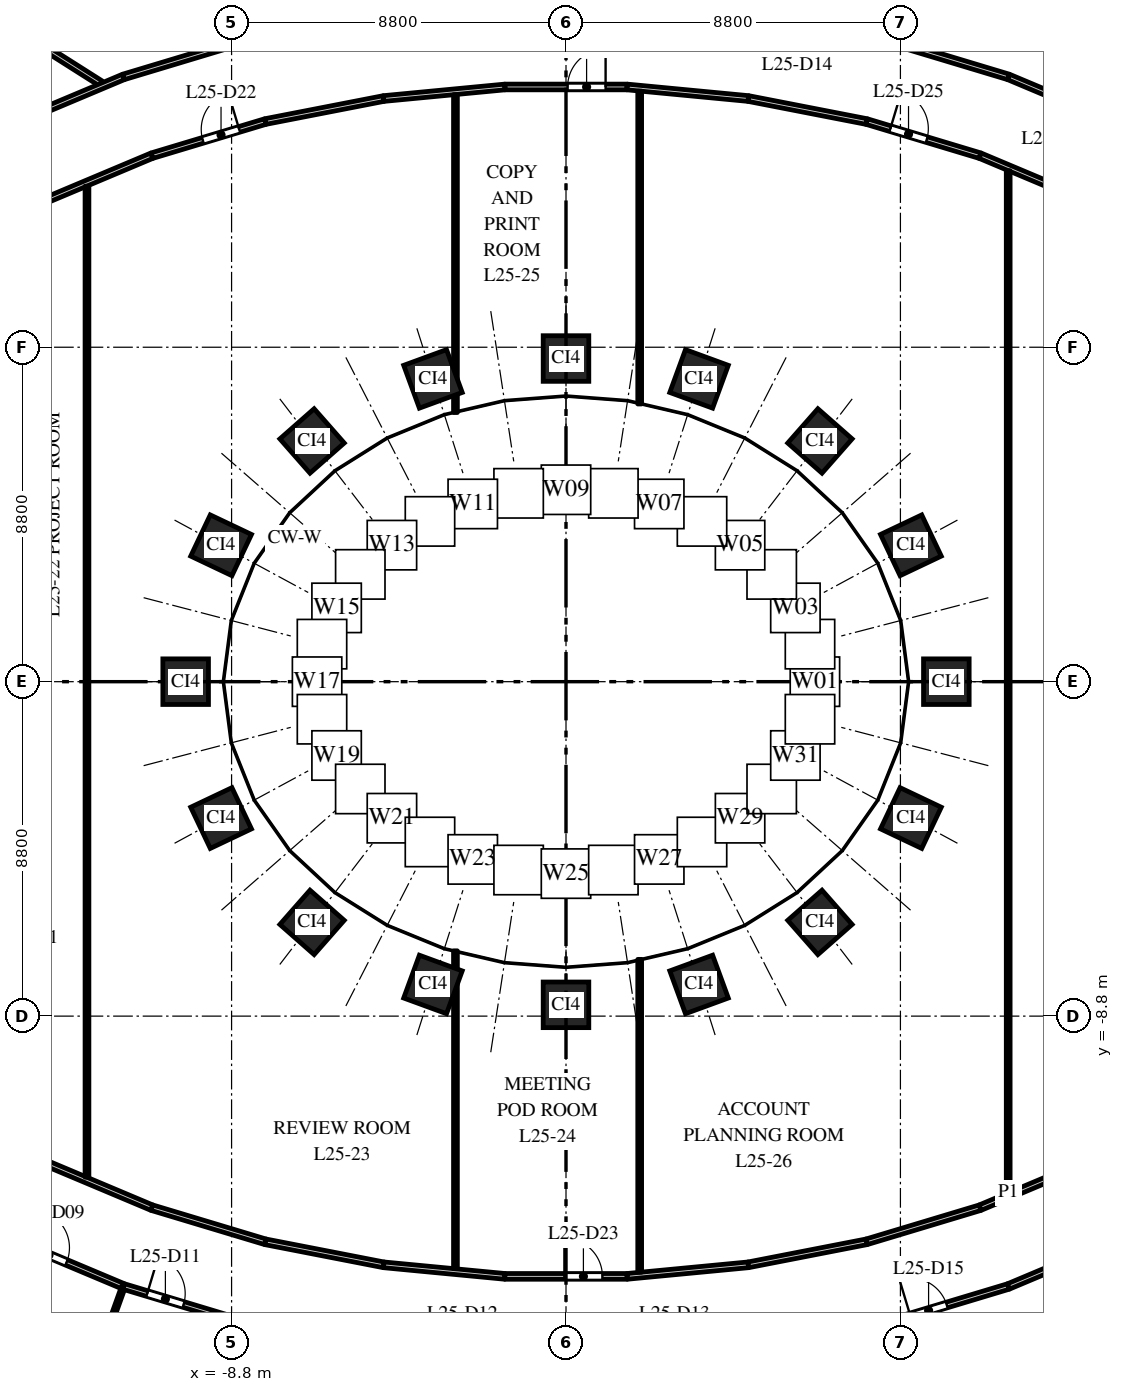
"""IFC4 building model, lengths in metres.
Left out: names, types, materials, properties, quantities, classifications, styles, units other than length and angle.
Written with IfcOpenShell. Run it as: python <this file> out.ifc"""

import sys

from ifc_helpers import new_model, si_unit, direction, frame, frame_2d, origin, origin_2d, place, context, subcontext, project, spatial, rectangle, extrude, element, fill, save


model = new_model("IFC4")
c1 = context("Model", 3, precision=1e-05, world=origin(), true_north=direction((0.0, 1.0)))
c2 = subcontext(c1, "Body", "Model", "MODEL_VIEW")
j1 = project(units=[si_unit("LENGTHUNIT", "METRE"), si_unit("PLANEANGLEUNIT", "RADIAN")], contexts=[c1])
p1 = place(None, origin())
s1 = spatial("IfcSite", under=j1, at=p1, CompositionType="ELEMENT")
p2 = place(p1, origin())
s2 = spatial("IfcBuilding", under=s1, at=p2, CompositionType="ELEMENT")
p3 = place(p2, frame((0.0, 0.0, 112.0)))
s3 = spatial("IfcBuildingStorey", under=s2, at=p3, CompositionType="ELEMENT", Elevation=112.0)
for number, where, z_axis, x_axis in (
    (1, (10.008, 0.0, 0.0), (0.0, 0.0, 1.0), (0.0, 1.0, 0.0)),
    (2, (9.076, 3.588, 0.0), (0.0, 0.0, 1.0), (-0.429, 0.903, 0.0)),
    (3, (6.682, 6.334, 0.0), (0.0, 0.0, 1.0), (-0.751, 0.66, 0.0)),
    (4, (3.501, 7.967, 0.0), (0.0, 0.0, 1.0), (-0.939, 0.344, 0.0)),
    (5, (0.0, 8.503, 0.0), (0.0, 0.0, 1.0), (-1.0, 0.0, 0.0)),
    (6, (-3.501, 7.967, 0.0), (0.0, 0.0, 1.0), (-0.939, -0.344, 0.0)),
    (7, (-6.682, 6.334, 0.0), (0.0, 0.0, 1.0), (-0.751, -0.66, 0.0)),
    (8, (-9.076, 3.588, 0.0), (0.0, 0.0, 1.0), (-0.429, -0.903, 0.0)),
    (9, (-10.008, 0.0, 0.0), (0.0, 0.0, 1.0), (0.0, -1.0, 0.0)),
    (10, (-9.076, -3.588, 0.0), (0.0, 0.0, 1.0), (0.429, -0.903, 0.0)),
    (11, (-6.682, -6.334, 0.0), (0.0, 0.0, 1.0), (0.751, -0.66, 0.0)),
    (12, (-3.501, -7.967, 0.0), (0.0, 0.0, 1.0), (0.939, -0.344, 0.0)),
    (13, (0.0, -8.503, 0.0), (0.0, 0.0, 1.0), (1.0, 0.0, 0.0)),
    (14, (3.501, -7.967, 0.0), (0.0, 0.0, 1.0), (0.939, 0.344, 0.0)),
    (15, (6.682, -6.334, 0.0), (0.0, 0.0, 1.0), (0.751, 0.66, 0.0)),
    (16, (9.076, -3.588, 0.0), (0.0, 0.0, 1.0), (0.429, 0.903, 0.0)),
):
    element("IfcColumn", number, at=place(p3, frame(where, z_axis=z_axis, x_axis=x_axis)), inside=s3, PredefinedType="COLUMN", context=c2, shape_type="SweptSolid", body=[
        extrude(rectangle(XDim=1.2, YDim=1.2, at=origin_2d()), origin(), (0.0, 0.0, 1.0), 4.0),
    ])
p4 = place(p3, frame((-16.899, 18.695, 0.0), z_axis=(0.0, 0.0, 1.0), x_axis=(0.844493920995, -0.535565138337, 0.0)))
e17 = element("IfcWall", 17, at=p4, inside=s3, PredefinedType="PARTITIONING", context=c2, shape_type="SweptSolid", body=[
    extrude(rectangle(XDim=5.512, YDim=0.15, at=frame_2d((2.756, 0.0))), origin(), (0.0, 0.0, 1.0), 2.85),
])
p5 = place(p3, frame((-14.665, -14.642, 0.0), z_axis=(0.0, 0.0, 1.0), x_axis=(0.921850993012, -0.387544509293, 0.0)))
e18 = element("IfcWall", 18, at=p5, inside=s3, PredefinedType="PARTITIONING", context=c2, shape_type="SweptSolid", body=[
    extrude(rectangle(XDim=3.259, YDim=0.15, at=frame_2d((1.629, 0.0))), origin(), (0.0, 0.0, 1.0), 2.85),
])
p6 = place(p5, frame((0.65, 0.0, 0.0)))
e19 = element("IfcOpeningElement", 19, at=p6, cuts=e18, PredefinedType="OPENING", context=c2, shape_type="SweptSolid", body=[
    extrude(rectangle(XDim=1.0, YDim=2.1, at=frame_2d((0.5, 1.05))), frame((0.0, 0.085, 0.0), z_axis=(0.0, -1.0, 0.0), x_axis=(1.0, 0.0, 0.0)), (0.0, 0.0, 1.0), 0.17),
])
p7 = place(p3, frame((-14.665, 14.642, 0.0), z_axis=(0.0, 0.0, 1.0), x_axis=(0.921789499058, 0.38769075231, 0.0)))
e20 = element("IfcWall", 20, at=p7, inside=s3, PredefinedType="PARTITIONING", context=c2, shape_type="SweptSolid", body=[
    extrude(rectangle(XDim=3.278, YDim=0.15, at=frame_2d((1.639, 0.0))), origin(), (0.0, 0.0, 1.0), 2.85),
])
for number, where, z_axis, x_axis in (
    (21, (-13.697, -12.662, 0.0), (0.0, 0.0, 1.0), (0.922, -0.388, 0.0)),
    (22, (-13.697, 12.662, 0.0), (0.0, 0.0, 1.0), (0.922, 0.388, 0.0)),
):
    element("IfcWall", number, at=place(p3, frame(where, z_axis=z_axis, x_axis=x_axis)), inside=s3, PredefinedType="PARTITIONING", context=c2, shape_type="SweptSolid", body=[
        extrude(rectangle(XDim=3.038, YDim=0.15, at=frame_2d((1.519, 0.0))), origin(), (0.0, 0.0, 1.0), 2.85),
    ])
p8 = place(p3, frame((-13.23, -20.327, 0.0), z_axis=(0.0, 0.0, 1.0), x_axis=(0.338411379185, 0.940998266969, 0.0)))
e23 = element("IfcWall", 23, at=p8, inside=s3, PredefinedType="PARTITIONING", context=c2, shape_type="SweptSolid", body=[
    extrude(rectangle(XDim=4.687, YDim=0.1, at=frame_2d((2.343, 0.0))), origin(), (0.0, 0.0, 1.0), 3.7),
])
p9 = place(p3, frame((-12.605, -13.036, 0.0), z_axis=(0.0, 0.0, 1.0), x_axis=(0.0, 1.0, 0.0)))
e24 = element("IfcWall", 24, at=p9, inside=s3, PredefinedType="PARTITIONING", context=c2, shape_type="SweptSolid", body=[
    extrude(rectangle(XDim=26.072, YDim=0.1, at=frame_2d((13.036, 0.0))), origin(), (0.0, 0.0, 1.0), 2.75),
])
p10 = place(p3, frame((-11.643, -15.913, 0.0), z_axis=(0.0, 0.0, 1.0), x_axis=(0.957584891346, -0.288151307243, 0.0)))
e25 = element("IfcWall", 25, at=p10, inside=s3, PredefinedType="PARTITIONING", context=c2, shape_type="SweptSolid", body=[
    extrude(rectangle(XDim=3.345, YDim=0.15, at=frame_2d((1.672, 0.0))), origin(), (0.0, 0.0, 1.0), 3.7),
])
p11 = place(p10, frame((0.65, 0.0, 0.0)))
e26 = element("IfcOpeningElement", 26, at=p11, cuts=e25, PredefinedType="OPENING", context=c2, shape_type="SweptSolid", body=[
    extrude(rectangle(XDim=1.0, YDim=2.1, at=frame_2d((0.5, 1.05))), frame((0.0, 0.085, 0.0), z_axis=(0.0, -1.0, 0.0), x_axis=(1.0, 0.0, 0.0)), (0.0, 0.0, 1.0), 0.17),
])
p12 = place(p3, frame((-11.643, 15.913, 0.0), z_axis=(0.0, 0.0, 1.0), x_axis=(0.957584891346, 0.288151307243, 0.0)))
e27 = element("IfcWall", 27, at=p12, inside=s3, PredefinedType="PARTITIONING", context=c2, shape_type="SweptSolid", body=[
    extrude(rectangle(XDim=3.345, YDim=0.15, at=frame_2d((1.672, 0.0))), origin(), (0.0, 0.0, 1.0), 3.7),
])
p13 = place(p3, frame((-10.897, -13.84, 0.0), z_axis=(0.0, 0.0, 1.0), x_axis=(0.957606118849, -0.28808075455, 0.0)))
e28 = element("IfcWall", 28, at=p13, inside=s3, PredefinedType="PARTITIONING", context=c2, shape_type="SweptSolid", body=[
    extrude(rectangle(XDim=3.117, YDim=0.15, at=frame_2d((1.559, 0.0))), origin(), (0.0, 0.0, 1.0), 3.7),
])
p14 = place(p3, frame((-10.897, 13.84, 0.0), z_axis=(0.0, 0.0, 1.0), x_axis=(0.957606118849, 0.28808075455, 0.0)))
e29 = element("IfcWall", 29, at=p14, inside=s3, PredefinedType="PARTITIONING", context=c2, shape_type="SweptSolid", body=[
    extrude(rectangle(XDim=3.117, YDim=0.15, at=frame_2d((1.559, 0.0))), origin(), (0.0, 0.0, 1.0), 3.7),
])
p15 = place(p14, frame((1.4, 0.0, 0.0)))
e30 = element("IfcOpeningElement", 30, at=p15, cuts=e29, PredefinedType="OPENING", context=c2, shape_type="SweptSolid", body=[
    extrude(rectangle(XDim=1.0, YDim=2.1, at=frame_2d((0.5, 1.05))), frame((0.0, 0.085, 0.0), z_axis=(0.0, -1.0, 0.0), x_axis=(1.0, 0.0, 0.0)), (0.0, 0.0, 1.0), 0.17),
])
for number, where, z_axis, x_axis in (
    (31, (-7.912, -14.738, 0.0), (0.0, 0.0, 1.0), (0.982, -0.191, 0.0)),
    (32, (-7.912, 14.738, 0.0), (0.0, 0.0, 1.0), (0.982, 0.191, 0.0)),
):
    element("IfcWall", number, at=place(p3, frame(where, z_axis=z_axis, x_axis=x_axis)), inside=s3, PredefinedType="PARTITIONING", context=c2, shape_type="SweptSolid", body=[
        extrude(rectangle(XDim=3.172, YDim=0.15, at=frame_2d((1.586, 0.0))), origin(), (0.0, 0.0, 1.0), 2.85),
    ])
for number, where, z_axis, x_axis in (
    (33, (-4.798, -15.344, 0.0), (0.0, 0.0, 1.0), (0.995, -0.095, 0.0)),
    (34, (-4.798, 15.344, 0.0), (0.0, 0.0, 1.0), (0.995, 0.095, 0.0)),
):
    element("IfcWall", number, at=place(p3, frame(where, z_axis=z_axis, x_axis=x_axis)), inside=s3, PredefinedType="PARTITIONING", context=c2, shape_type="SweptSolid", body=[
        extrude(rectangle(XDim=3.205, YDim=0.15, at=frame_2d((1.602, 0.0))), origin(), (0.0, 0.0, 1.0), 3.7),
    ])
for number, where, z_axis, x_axis in (
    (35, (-2.909, -15.445, 0.0), (0.0, 0.0, 1.0), (0.0, 1.0, 0.0)),
    (36, (-2.909, 7.082, 0.0), (0.0, 0.0, 1.0), (0.0, 1.0, 0.0)),
):
    element("IfcWall", number, at=place(p3, frame(where, z_axis=z_axis, x_axis=x_axis)), inside=s3, PredefinedType="PARTITIONING", context=c2, shape_type="SweptSolid", body=[
        extrude(rectangle(XDim=8.363, YDim=0.1, at=frame_2d((4.182, 0.0))), origin(), (0.0, 0.0, 1.0), 2.9),
    ])
p16 = place(p3, frame((-1.608, -15.648, 0.0), z_axis=(0.0, 0.0, 1.0), x_axis=(1.0, 0.0, 0.0)))
e37 = element("IfcWall", 37, at=p16, inside=s3, PredefinedType="PARTITIONING", context=c2, shape_type="SweptSolid", body=[
    extrude(rectangle(XDim=3.216, YDim=0.15, at=frame_2d((1.608, 0.0))), origin(), (0.0, 0.0, 1.0), 2.85),
])
p17 = place(p16, frame((1.566, 0.0, 0.0)))
e38 = element("IfcOpeningElement", 38, at=p17, cuts=e37, PredefinedType="OPENING", context=c2, shape_type="SweptSolid", body=[
    extrude(rectangle(XDim=1.0, YDim=2.1, at=frame_2d((0.5, 1.05))), frame((0.0, 0.085, 0.0), z_axis=(0.0, -1.0, 0.0), x_axis=(1.0, 0.0, 0.0)), (0.0, 0.0, 1.0), 0.17),
])
p18 = place(p3, frame((-1.608, 15.648, 0.0), z_axis=(0.0, 0.0, 1.0), x_axis=(1.0, 0.0, 0.0)))
e39 = element("IfcWall", 39, at=p18, inside=s3, PredefinedType="PARTITIONING", context=c2, shape_type="SweptSolid", body=[
    extrude(rectangle(XDim=3.216, YDim=0.15, at=frame_2d((1.608, 0.0))), origin(), (0.0, 0.0, 1.0), 2.85),
])
p19 = place(p18, frame((1.65, 0.0, 0.0)))
e40 = element("IfcOpeningElement", 40, at=p19, cuts=e39, PredefinedType="OPENING", context=c2, shape_type="SweptSolid", body=[
    extrude(rectangle(XDim=1.0, YDim=2.1, at=frame_2d((0.5, 1.05))), frame((0.0, 0.085, 0.0), z_axis=(0.0, -1.0, 0.0), x_axis=(1.0, 0.0, 0.0)), (0.0, 0.0, 1.0), 0.17),
])
for number, where, z_axis, x_axis in (
    (41, (1.608, -15.648, 0.0), (0.0, 0.0, 1.0), (0.995, 0.095, 0.0)),
    (42, (1.608, 15.648, 0.0), (0.0, 0.0, 1.0), (0.995, -0.095, 0.0)),
):
    element("IfcWall", number, at=place(p3, frame(where, z_axis=z_axis, x_axis=x_axis)), inside=s3, PredefinedType="PARTITIONING", context=c2, shape_type="SweptSolid", body=[
        extrude(rectangle(XDim=3.205, YDim=0.15, at=frame_2d((1.602, 0.0))), origin(), (0.0, 0.0, 1.0), 2.85),
    ])
for number, where, z_axis, x_axis in (
    (43, (1.939, -15.537, 0.0), (0.0, 0.0, 1.0), (0.0, 1.0, 0.0)),
    (44, (1.939, 7.307, 0.0), (0.0, 0.0, 1.0), (0.0, 1.0, 0.0)),
):
    element("IfcWall", number, at=place(p3, frame(where, z_axis=z_axis, x_axis=x_axis)), inside=s3, PredefinedType="PARTITIONING", context=c2, shape_type="SweptSolid", body=[
        extrude(rectangle(XDim=8.23, YDim=0.1, at=frame_2d((4.115, 0.0))), origin(), (0.0, 0.0, 1.0), 2.85),
    ])
for number, where, z_axis, x_axis in (
    (45, (4.798, -15.344, 0.0), (0.0, 0.0, 1.0), (0.982, 0.191, 0.0)),
    (46, (4.798, 15.344, 0.0), (0.0, 0.0, 1.0), (0.982, -0.191, 0.0)),
):
    element("IfcWall", number, at=place(p3, frame(where, z_axis=z_axis, x_axis=x_axis)), inside=s3, PredefinedType="PARTITIONING", context=c2, shape_type="SweptSolid", body=[
        extrude(rectangle(XDim=3.172, YDim=0.15, at=frame_2d((1.586, 0.0))), origin(), (0.0, 0.0, 1.0), 3.7),
    ])
p20 = place(p3, frame((7.912, -14.738, 0.0), z_axis=(0.0, 0.0, 1.0), x_axis=(0.957606118849, 0.28808075455, 0.0)))
e47 = element("IfcWall", 47, at=p20, inside=s3, PredefinedType="PARTITIONING", context=c2, shape_type="SweptSolid", body=[
    extrude(rectangle(XDim=3.117, YDim=0.15, at=frame_2d((1.559, 0.0))), origin(), (0.0, 0.0, 1.0), 2.85),
])
p21 = place(p3, frame((7.912, 14.738, 0.0), z_axis=(0.0, 0.0, 1.0), x_axis=(0.957606118849, -0.28808075455, 0.0)))
e48 = element("IfcWall", 48, at=p21, inside=s3, PredefinedType="PARTITIONING", context=c2, shape_type="SweptSolid", body=[
    extrude(rectangle(XDim=3.117, YDim=0.15, at=frame_2d((1.559, 0.0))), origin(), (0.0, 0.0, 1.0), 2.85),
])
p22 = place(p21, frame((0.65, 0.0, 0.0)))
e49 = element("IfcOpeningElement", 49, at=p22, cuts=e48, PredefinedType="OPENING", context=c2, shape_type="SweptSolid", body=[
    extrude(rectangle(XDim=1.0, YDim=2.1, at=frame_2d((0.5, 1.05))), frame((0.0, 0.085, 0.0), z_axis=(0.0, -1.0, 0.0), x_axis=(1.0, 0.0, 0.0)), (0.0, 0.0, 1.0), 0.17),
])
p23 = place(p3, frame((8.44, 16.877, 0.0), z_axis=(0.0, 0.0, 1.0), x_axis=(0.957584891346, -0.288151307243, 0.0)))
e50 = element("IfcWall", 50, at=p23, inside=s3, PredefinedType="PARTITIONING", context=c2, shape_type="SweptSolid", body=[
    extrude(rectangle(XDim=3.345, YDim=0.15, at=frame_2d((1.672, 0.0))), origin(), (0.0, 0.0, 1.0), 2.85),
])
p24 = place(p3, frame((8.459, -16.871, 0.0), z_axis=(0.0, 0.0, 1.0), x_axis=(0.957595601217, 0.288115713784, 0.0)))
e51 = element("IfcWall", 51, at=p24, inside=s3, PredefinedType="PARTITIONING", context=c2, shape_type="SweptSolid", body=[
    extrude(rectangle(XDim=3.325, YDim=0.15, at=frame_2d((1.663, 0.0))), origin(), (0.0, 0.0, 1.0), 2.85),
])
p25 = place(p24, frame((0.63, 0.0, 0.0)))
e52 = element("IfcOpeningElement", 52, at=p25, cuts=e51, PredefinedType="OPENING", context=c2, shape_type="SweptSolid", body=[
    extrude(rectangle(XDim=1.0, YDim=2.1, at=frame_2d((0.5, 1.05))), frame((0.0, 0.085, 0.0), z_axis=(0.0, -1.0, 0.0), x_axis=(1.0, 0.0, 0.0)), (0.0, 0.0, 1.0), 0.17),
])
for number, where, z_axis, x_axis in (
    (53, (10.897, -13.84, 0.0), (0.0, 0.0, 1.0), (0.922, 0.388, 0.0)),
    (54, (10.897, 13.84, 0.0), (0.0, 0.0, 1.0), (0.922, -0.388, 0.0)),
):
    element("IfcWall", number, at=place(p3, frame(where, z_axis=z_axis, x_axis=x_axis)), inside=s3, PredefinedType="PARTITIONING", context=c2, shape_type="SweptSolid", body=[
        extrude(rectangle(XDim=3.038, YDim=0.15, at=frame_2d((1.519, 0.0))), origin(), (0.0, 0.0, 1.0), 3.7),
    ])
p26 = place(p3, frame((11.636, -13.444, 0.0), z_axis=(0.0, 0.0, 1.0), x_axis=(0.0, 1.0, 0.0)))
e55 = element("IfcWall", 55, at=p26, inside=s3, PredefinedType="PARTITIONING", context=c2, shape_type="SweptSolid", body=[
    extrude(rectangle(XDim=26.888, YDim=0.1, at=frame_2d((13.444, 0.0))), origin(), (0.0, 0.0, 1.0), 2.75),
])
for number, where, z_axis, x_axis in (
    (56, (11.643, -15.913, 0.0), (0.0, 0.0, 1.0), (0.922, 0.388, 0.0)),
    (57, (11.643, 15.913, 0.0), (0.0, 0.0, 1.0), (0.922, -0.388, 0.0)),
):
    element("IfcWall", number, at=place(p3, frame(where, z_axis=z_axis, x_axis=x_axis)), inside=s3, PredefinedType="PARTITIONING", context=c2, shape_type="SweptSolid", body=[
        extrude(rectangle(XDim=3.278, YDim=0.15, at=frame_2d((1.639, 0.0))), origin(), (0.0, 0.0, 1.0), 3.7),
    ])
p27 = place(p6, origin())
e58 = element("IfcDoor", 58, at=p27, inside=s3, OperationType="SINGLE_SWING_LEFT", PredefinedType="DOOR", context=c2, shape_type="SweptSolid", body=[
    extrude(rectangle(XDim=1.0, YDim=2.1, at=frame_2d((0.5, 1.05))), frame((0.0, 0.025, 0.0), z_axis=(0.0, -1.0, 0.0), x_axis=(1.0, 0.0, 0.0)), (0.0, 0.0, 1.0), 0.05),
])
fill(e19, e58)
p28 = place(p11, origin())
e59 = element("IfcDoor", 59, at=p28, inside=s3, OperationType="SINGLE_SWING_LEFT", PredefinedType="DOOR", context=c2, shape_type="SweptSolid", body=[
    extrude(rectangle(XDim=1.0, YDim=2.1, at=frame_2d((0.5, 1.05))), frame((0.0, 0.025, 0.0), z_axis=(0.0, -1.0, 0.0), x_axis=(1.0, 0.0, 0.0)), (0.0, 0.0, 1.0), 0.05),
])
fill(e26, e59)
p29 = place(p25, origin())
e60 = element("IfcDoor", 60, at=p29, inside=s3, OperationType="SINGLE_SWING_LEFT", PredefinedType="DOOR", context=c2, shape_type="SweptSolid", body=[
    extrude(rectangle(XDim=1.0, YDim=2.1, at=frame_2d((0.5, 1.05))), frame((0.0, 0.025, 0.0), z_axis=(0.0, -1.0, 0.0), x_axis=(1.0, 0.0, 0.0)), (0.0, 0.0, 1.0), 0.05),
])
fill(e52, e60)
p30 = place(p15, origin())
e61 = element("IfcDoor", 61, at=p30, inside=s3, OperationType="SINGLE_SWING_RIGHT", PredefinedType="DOOR", context=c2, shape_type="SweptSolid", body=[
    extrude(rectangle(XDim=1.0, YDim=2.1, at=frame_2d((0.5, 1.05))), frame((0.0, 0.025, 0.0), z_axis=(0.0, -1.0, 0.0), x_axis=(1.0, 0.0, 0.0)), (0.0, 0.0, 1.0), 0.05),
])
fill(e30, e61)
p31 = place(p17, origin())
e62 = element("IfcDoor", 62, at=p31, inside=s3, OperationType="SINGLE_SWING_LEFT", PredefinedType="DOOR", context=c2, shape_type="SweptSolid", body=[
    extrude(rectangle(XDim=1.0, YDim=2.1, at=frame_2d((0.5, 1.05))), frame((0.0, 0.025, 0.0), z_axis=(0.0, -1.0, 0.0), x_axis=(1.0, 0.0, 0.0)), (0.0, 0.0, 1.0), 0.05),
])
fill(e38, e62)
p32 = place(p19, origin())
e63 = element("IfcDoor", 63, at=p32, inside=s3, OperationType="SINGLE_SWING_RIGHT", PredefinedType="DOOR", context=c2, shape_type="SweptSolid", body=[
    extrude(rectangle(XDim=1.0, YDim=2.1, at=frame_2d((0.5, 1.05))), frame((0.0, 0.025, 0.0), z_axis=(0.0, -1.0, 0.0), x_axis=(1.0, 0.0, 0.0)), (0.0, 0.0, 1.0), 0.05),
])
fill(e40, e63)
p33 = place(p22, origin())
e64 = element("IfcDoor", 64, at=p33, inside=s3, OperationType="SINGLE_SWING_LEFT", PredefinedType="DOOR", context=c2, shape_type="SweptSolid", body=[
    extrude(rectangle(XDim=1.0, YDim=2.1, at=frame_2d((0.5, 1.05))), frame((0.0, 0.025, 0.0), z_axis=(0.0, -1.0, 0.0), x_axis=(1.0, 0.0, 0.0)), (0.0, 0.0, 1.0), 0.05),
])
fill(e49, e64)
save(model, sys.argv[1])
